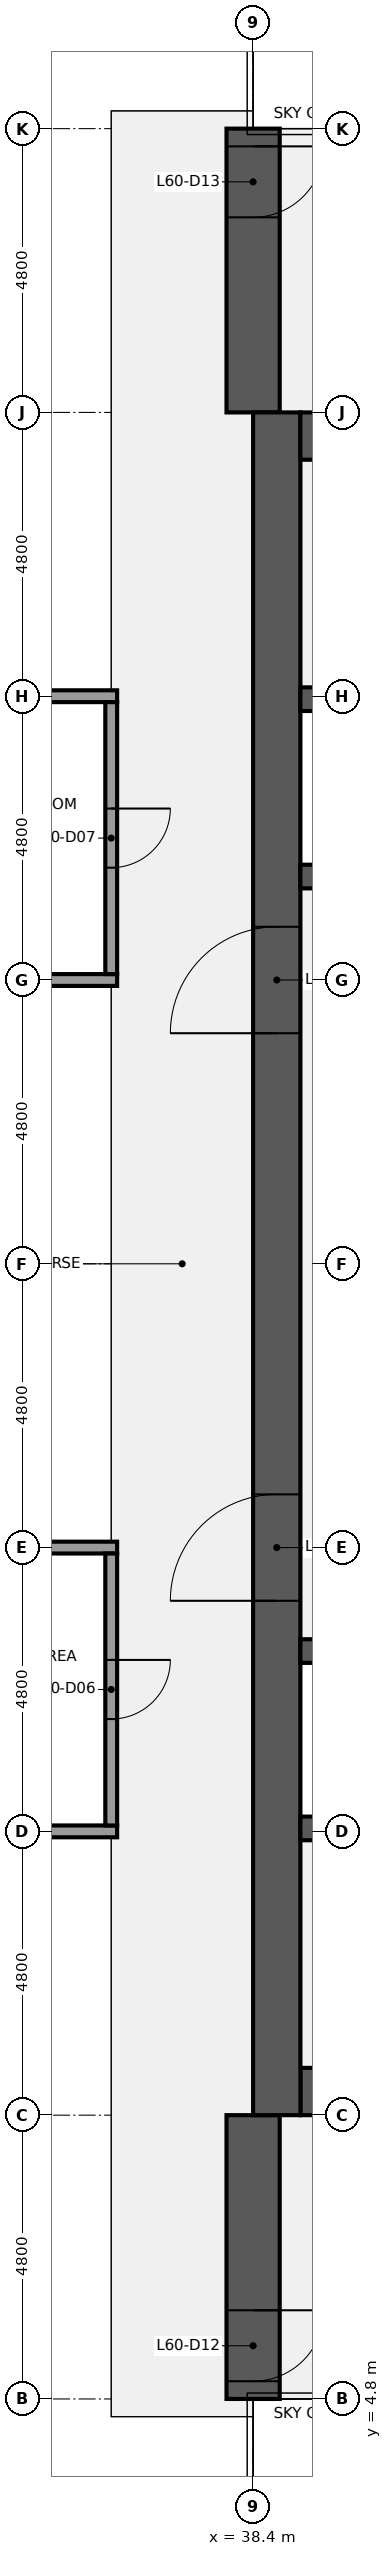
"""IFC4 building model, lengths in metres.
Left out: names, types, materials, properties, quantities, classifications, styles, units other than length and angle.
Written with IfcOpenShell. Run it as: python <this file> out.ifc"""

import sys

from ifc_helpers import new_model, si_unit, direction, frame, frame_2d, origin, place, context, subcontext, project, spatial, rectangle, extrude, element, fill, save


model = new_model("IFC4")
c1 = context("Model", 3, precision=1e-05, world=origin(), true_north=direction((0.0, 1.0)))
c2 = subcontext(c1, "Body", "Model", "MODEL_VIEW")
j1 = project(units=[si_unit("LENGTHUNIT", "METRE"), si_unit("PLANEANGLEUNIT", "RADIAN")], contexts=[c1])
p1 = place(None, origin())
s1 = spatial("IfcSite", under=j1, at=p1, CompositionType="ELEMENT")
p2 = place(p1, origin())
s2 = spatial("IfcBuilding", under=s1, at=p2, CompositionType="ELEMENT")
p3 = place(p2, frame((0.0, 0.0, 269.7)))
s3 = spatial("IfcBuildingStorey", under=s2, at=p3, CompositionType="ELEMENT", Elevation=269.7)
p4 = place(p3, frame((38.4, 4.8, 0.0), z_axis=(0.0, 0.0, 1.0), x_axis=(0.0, 1.0, 0.0)))
e1 = element("IfcWall", 1, at=p4, inside=s3, PredefinedType="SHEAR", context=c2, shape_type="SweptSolid", body=[
    extrude(rectangle(XDim=4.8, YDim=0.9, at=frame_2d((2.4, 0.0))), origin(), (0.0, 0.0, 1.0), 12.3),
])
p5 = place(p4, frame((0.3, 0.0, 0.0)))
e2 = element("IfcOpeningElement", 2, at=p5, cuts=e1, PredefinedType="OPENING", context=c2, shape_type="SweptSolid", body=[
    extrude(rectangle(XDim=1.2, YDim=2.1, at=frame_2d((0.6, 1.05))), frame((0.0, 0.46, 0.0), z_axis=(0.0, -1.0, 0.0), x_axis=(1.0, 0.0, 0.0)), (0.0, 0.0, 1.0), 0.92),
])
p6 = place(p3, frame((38.4, 38.4, 0.0), z_axis=(0.0, 0.0, 1.0), x_axis=(0.0, 1.0, 0.0)))
e3 = element("IfcWall", 3, at=p6, inside=s3, PredefinedType="SHEAR", context=c2, shape_type="SweptSolid", body=[
    extrude(rectangle(XDim=4.8, YDim=0.9, at=frame_2d((2.4, 0.0))), origin(), (0.0, 0.0, 1.0), 12.3),
])
p7 = place(p6, frame((3.3, 0.0, 0.0)))
e4 = element("IfcOpeningElement", 4, at=p7, cuts=e3, PredefinedType="OPENING", context=c2, shape_type="SweptSolid", body=[
    extrude(rectangle(XDim=1.2, YDim=2.1, at=frame_2d((0.6, 1.05))), frame((0.0, 0.46, 0.0), z_axis=(0.0, -1.0, 0.0), x_axis=(1.0, 0.0, 0.0)), (0.0, 0.0, 1.0), 0.92),
])
p8 = place(p3, frame((56.8, 10.0, 0.0), z_axis=(0.0, 0.0, 1.0), x_axis=(-1.0, 0.0, 0.0)))
e5 = element("IfcWall", 5, at=p8, inside=s3, PredefinedType="SHEAR", context=c2, shape_type="SweptSolid", body=[
    extrude(rectangle(XDim=17.6, YDim=0.8, at=frame_2d((8.8, 0.0))), origin(), (0.0, 0.0, 1.0), 12.3),
])
p9 = place(p8, frame((15.45, 0.0, 0.0)))
e6 = element("IfcOpeningElement", 6, at=p9, cuts=e5, PredefinedType="OPENING", context=c2, shape_type="SweptSolid", body=[
    extrude(rectangle(XDim=1.1, YDim=2.1, at=frame_2d((0.55, 1.05))), frame((0.0, 0.41, 0.0), z_axis=(0.0, -1.0, 0.0), x_axis=(1.0, 0.0, 0.0)), (0.0, 0.0, 1.0), 0.82),
])
p10 = place(p8, frame((5.5, 0.0, 0.9)))
e7 = element("IfcOpeningElement", 7, at=p10, cuts=e5, PredefinedType="OPENING", context=c2, shape_type="SweptSolid", body=[
    extrude(rectangle(XDim=1.8, YDim=1.5, at=frame_2d((0.9, 0.75))), frame((0.0, 0.41, 0.0), z_axis=(0.0, -1.0, 0.0), x_axis=(1.0, 0.0, 0.0)), (0.0, 0.0, 1.0), 0.82),
])
p11 = place(p8, frame((10.3, 0.0, 0.9)))
e8 = element("IfcOpeningElement", 8, at=p11, cuts=e5, PredefinedType="OPENING", context=c2, shape_type="SweptSolid", body=[
    extrude(rectangle(XDim=1.8, YDim=1.5, at=frame_2d((0.9, 0.75))), frame((0.0, 0.41, 0.0), z_axis=(0.0, -1.0, 0.0), x_axis=(1.0, 0.0, 0.0)), (0.0, 0.0, 1.0), 0.82),
])
p12 = place(p3, frame((38.8, 9.6, 0.0), z_axis=(0.0, 0.0, 1.0), x_axis=(0.0, 1.0, 0.0)))
e9 = element("IfcWall", 9, at=p12, inside=s3, PredefinedType="SHEAR", context=c2, shape_type="SweptSolid", body=[
    extrude(rectangle(XDim=28.8, YDim=0.8, at=frame_2d((14.4, 0.0))), origin(), (0.0, 0.0, 1.0), 12.3),
])
p13 = place(p12, frame((8.7, 0.0, 0.0)))
e10 = element("IfcOpeningElement", 10, at=p13, cuts=e9, PredefinedType="OPENING", context=c2, shape_type="SweptSolid", body=[
    extrude(rectangle(XDim=1.8, YDim=2.1, at=frame_2d((0.9, 1.05))), frame((0.0, 0.41, 0.0), z_axis=(0.0, -1.0, 0.0), x_axis=(1.0, 0.0, 0.0)), (0.0, 0.0, 1.0), 0.82),
])
p14 = place(p12, frame((18.3, 0.0, 0.0)))
e11 = element("IfcOpeningElement", 11, at=p14, cuts=e9, PredefinedType="OPENING", context=c2, shape_type="SweptSolid", body=[
    extrude(rectangle(XDim=1.8, YDim=2.1, at=frame_2d((0.9, 1.05))), frame((0.0, 0.41, 0.0), z_axis=(0.0, -1.0, 0.0), x_axis=(1.0, 0.0, 0.0)), (0.0, 0.0, 1.0), 0.82),
])
p15 = place(p3, frame((39.2, 14.45, 0.0), z_axis=(0.0, 0.0, 1.0), x_axis=(1.0, 0.0, 0.0)))
e12 = element("IfcWall", 12, at=p15, inside=s3, PredefinedType="SHEAR", context=c2, shape_type="SweptSolid", body=[
    extrude(rectangle(XDim=17.6, YDim=0.4, at=frame_2d((8.8, 0.0))), origin(), (0.0, 0.0, 1.0), 12.3),
])
p16 = place(p3, frame((39.2, 17.45, 0.0), z_axis=(0.0, 0.0, 1.0), x_axis=(1.0, 0.0, 0.0)))
e13 = element("IfcWall", 13, at=p16, inside=s3, PredefinedType="SHEAR", context=c2, shape_type="SweptSolid", body=[
    extrude(rectangle(XDim=17.6, YDim=0.4, at=frame_2d((8.8, 0.0))), origin(), (0.0, 0.0, 1.0), 12.3),
])
p17 = place(p16, frame((14.837, 0.0, 0.0)))
e14 = element("IfcOpeningElement", 14, at=p17, cuts=e13, PredefinedType="OPENING", context=c2, shape_type="SweptSolid", body=[
    extrude(rectangle(XDim=1.0, YDim=2.1, at=frame_2d((0.5, 1.05))), frame((0.0, 0.21, 0.0), z_axis=(0.0, -1.0, 0.0), x_axis=(1.0, 0.0, 0.0)), (0.0, 0.0, 1.0), 0.42),
])
p18 = place(p16, frame((11.3, 0.0, 0.0)))
e15 = element("IfcOpeningElement", 15, at=p18, cuts=e13, PredefinedType="OPENING", context=c2, shape_type="SweptSolid", body=[
    extrude(rectangle(XDim=1.0, YDim=2.1, at=frame_2d((0.5, 1.05))), frame((0.0, 0.21, 0.0), z_axis=(0.0, -1.0, 0.0), x_axis=(1.0, 0.0, 0.0)), (0.0, 0.0, 1.0), 0.42),
])
p19 = place(p16, frame((7.1, 0.0, 0.0)))
e16 = element("IfcOpeningElement", 16, at=p19, cuts=e13, PredefinedType="OPENING", context=c2, shape_type="SweptSolid", body=[
    extrude(rectangle(XDim=1.0, YDim=2.1, at=frame_2d((0.5, 1.05))), frame((0.0, 0.21, 0.0), z_axis=(0.0, -1.0, 0.0), x_axis=(1.0, 0.0, 0.0)), (0.0, 0.0, 1.0), 0.42),
])
p20 = place(p16, frame((1.762, 0.0, 0.0)))
e17 = element("IfcOpeningElement", 17, at=p20, cuts=e13, PredefinedType="OPENING", context=c2, shape_type="SweptSolid", body=[
    extrude(rectangle(XDim=1.0, YDim=2.1, at=frame_2d((0.5, 1.05))), frame((0.0, 0.21, 0.0), z_axis=(0.0, -1.0, 0.0), x_axis=(1.0, 0.0, 0.0)), (0.0, 0.0, 1.0), 0.42),
])
p21 = place(p3, frame((39.2, 30.55, 0.0), z_axis=(0.0, 0.0, 1.0), x_axis=(1.0, 0.0, 0.0)))
e18 = element("IfcWall", 18, at=p21, inside=s3, PredefinedType="SHEAR", context=c2, shape_type="SweptSolid", body=[
    extrude(rectangle(XDim=17.6, YDim=0.4, at=frame_2d((8.8, 0.0))), origin(), (0.0, 0.0, 1.0), 12.3),
])
p22 = place(p21, frame((15.0, 0.0, 0.0)))
e19 = element("IfcOpeningElement", 19, at=p22, cuts=e18, PredefinedType="OPENING", context=c2, shape_type="SweptSolid", body=[
    extrude(rectangle(XDim=1.2, YDim=2.1, at=frame_2d((0.6, 1.05))), frame((0.0, 0.21, 0.0), z_axis=(0.0, -1.0, 0.0), x_axis=(1.0, 0.0, 0.0)), (0.0, 0.0, 1.0), 0.42),
])
p23 = place(p21, frame((12.4, 0.0, 0.0)))
e20 = element("IfcOpeningElement", 20, at=p23, cuts=e18, PredefinedType="OPENING", context=c2, shape_type="SweptSolid", body=[
    extrude(rectangle(XDim=1.2, YDim=2.1, at=frame_2d((0.6, 1.05))), frame((0.0, 0.21, 0.0), z_axis=(0.0, -1.0, 0.0), x_axis=(1.0, 0.0, 0.0)), (0.0, 0.0, 1.0), 0.42),
])
p24 = place(p21, frame((9.8, 0.0, 0.0)))
e21 = element("IfcOpeningElement", 21, at=p24, cuts=e18, PredefinedType="OPENING", context=c2, shape_type="SweptSolid", body=[
    extrude(rectangle(XDim=1.2, YDim=2.1, at=frame_2d((0.6, 1.05))), frame((0.0, 0.21, 0.0), z_axis=(0.0, -1.0, 0.0), x_axis=(1.0, 0.0, 0.0)), (0.0, 0.0, 1.0), 0.42),
])
p25 = place(p21, frame((6.6, 0.0, 0.0)))
e22 = element("IfcOpeningElement", 22, at=p25, cuts=e18, PredefinedType="OPENING", context=c2, shape_type="SweptSolid", body=[
    extrude(rectangle(XDim=1.2, YDim=2.1, at=frame_2d((0.6, 1.05))), frame((0.0, 0.21, 0.0), z_axis=(0.0, -1.0, 0.0), x_axis=(1.0, 0.0, 0.0)), (0.0, 0.0, 1.0), 0.42),
])
p26 = place(p21, frame((4.0, 0.0, 0.0)))
e23 = element("IfcOpeningElement", 23, at=p26, cuts=e18, PredefinedType="OPENING", context=c2, shape_type="SweptSolid", body=[
    extrude(rectangle(XDim=1.2, YDim=2.1, at=frame_2d((0.6, 1.05))), frame((0.0, 0.21, 0.0), z_axis=(0.0, -1.0, 0.0), x_axis=(1.0, 0.0, 0.0)), (0.0, 0.0, 1.0), 0.42),
])
p27 = place(p21, frame((1.4, 0.0, 0.0)))
e24 = element("IfcOpeningElement", 24, at=p27, cuts=e18, PredefinedType="OPENING", context=c2, shape_type="SweptSolid", body=[
    extrude(rectangle(XDim=1.2, YDim=2.1, at=frame_2d((0.6, 1.05))), frame((0.0, 0.21, 0.0), z_axis=(0.0, -1.0, 0.0), x_axis=(1.0, 0.0, 0.0)), (0.0, 0.0, 1.0), 0.42),
])
p28 = place(p3, frame((39.2, 33.55, 0.0), z_axis=(0.0, 0.0, 1.0), x_axis=(1.0, 0.0, 0.0)))
e25 = element("IfcWall", 25, at=p28, inside=s3, PredefinedType="SHEAR", context=c2, shape_type="SweptSolid", body=[
    extrude(rectangle(XDim=17.6, YDim=0.4, at=frame_2d((8.8, 0.0))), origin(), (0.0, 0.0, 1.0), 12.3),
])
p29 = place(p3, frame((39.2, 38.0, 0.0), z_axis=(0.0, 0.0, 1.0), x_axis=(1.0, 0.0, 0.0)))
e26 = element("IfcWall", 26, at=p29, inside=s3, PredefinedType="SHEAR", context=c2, shape_type="SweptSolid", body=[
    extrude(rectangle(XDim=17.6, YDim=0.8, at=frame_2d((8.8, 0.0))), origin(), (0.0, 0.0, 1.0), 12.3),
])
p30 = place(p29, frame((1.05, 0.0, 0.0)))
e27 = element("IfcOpeningElement", 27, at=p30, cuts=e26, PredefinedType="OPENING", context=c2, shape_type="SweptSolid", body=[
    extrude(rectangle(XDim=1.1, YDim=2.1, at=frame_2d((0.55, 1.05))), frame((0.0, 0.41, 0.0), z_axis=(0.0, -1.0, 0.0), x_axis=(1.0, 0.0, 0.0)), (0.0, 0.0, 1.0), 0.82),
])
p31 = place(p29, frame((10.3, 0.0, 0.9)))
e28 = element("IfcOpeningElement", 28, at=p31, cuts=e26, PredefinedType="OPENING", context=c2, shape_type="SweptSolid", body=[
    extrude(rectangle(XDim=1.8, YDim=1.5, at=frame_2d((0.9, 0.75))), frame((0.0, 0.41, 0.0), z_axis=(0.0, -1.0, 0.0), x_axis=(1.0, 0.0, 0.0)), (0.0, 0.0, 1.0), 0.82),
])
p32 = place(p29, frame((5.5, 0.0, 0.9)))
e29 = element("IfcOpeningElement", 29, at=p32, cuts=e26, PredefinedType="OPENING", context=c2, shape_type="SweptSolid", body=[
    extrude(rectangle(XDim=1.8, YDim=1.5, at=frame_2d((0.9, 0.75))), frame((0.0, 0.41, 0.0), z_axis=(0.0, -1.0, 0.0), x_axis=(1.0, 0.0, 0.0)), (0.0, 0.0, 1.0), 0.82),
])
for number, where, z_axis, x_axis in (
    (30, (31.1, 14.4, 0.0), (0.0, 0.0, 1.0), (1.0, 0.0, 0.0)),
    (31, (31.1, 19.2, 0.0), (0.0, 0.0, 1.0), (1.0, 0.0, 0.0)),
    (32, (31.1, 28.8, 0.0), (0.0, 0.0, 1.0), (1.0, 0.0, 0.0)),
    (33, (31.1, 33.6, 0.0), (0.0, 0.0, 1.0), (1.0, 0.0, 0.0)),
):
    element("IfcWall", number, at=place(p3, frame(where, z_axis=z_axis, x_axis=x_axis)), inside=s3, PredefinedType="PARTITIONING", context=c2, shape_type="SweptSolid", body=[
        extrude(rectangle(XDim=5.0, YDim=0.2, at=frame_2d((2.5, 0.0))), origin(), (0.0, 0.0, 1.0), 11.31),
    ])
p33 = place(p3, frame((36.0, 14.5, 0.0), z_axis=(0.0, 0.0, 1.0), x_axis=(0.0, 1.0, 0.0)))
e34 = element("IfcWall", 34, at=p33, inside=s3, PredefinedType="PARTITIONING", context=c2, shape_type="SweptSolid", body=[
    extrude(rectangle(XDim=4.6, YDim=0.2, at=frame_2d((2.3, 0.0))), origin(), (0.0, 0.0, 1.0), 11.31),
])
p34 = place(p33, frame((1.8, 0.0, 0.0)))
e35 = element("IfcOpeningElement", 35, at=p34, cuts=e34, PredefinedType="OPENING", context=c2, shape_type="SweptSolid", body=[
    extrude(rectangle(XDim=1.0, YDim=2.1, at=frame_2d((0.5, 1.05))), frame((0.0, 0.11, 0.0), z_axis=(0.0, -1.0, 0.0), x_axis=(1.0, 0.0, 0.0)), (0.0, 0.0, 1.0), 0.22),
])
p35 = place(p3, frame((36.0, 28.9, 0.0), z_axis=(0.0, 0.0, 1.0), x_axis=(0.0, 1.0, 0.0)))
e36 = element("IfcWall", 36, at=p35, inside=s3, PredefinedType="PARTITIONING", context=c2, shape_type="SweptSolid", body=[
    extrude(rectangle(XDim=4.6, YDim=0.2, at=frame_2d((2.3, 0.0))), origin(), (0.0, 0.0, 1.0), 11.31),
])
p36 = place(p35, frame((1.8, 0.0, 0.0)))
e37 = element("IfcOpeningElement", 37, at=p36, cuts=e36, PredefinedType="OPENING", context=c2, shape_type="SweptSolid", body=[
    extrude(rectangle(XDim=1.0, YDim=2.1, at=frame_2d((0.5, 1.05))), frame((0.0, 0.11, 0.0), z_axis=(0.0, -1.0, 0.0), x_axis=(1.0, 0.0, 0.0)), (0.0, 0.0, 1.0), 0.22),
])
p37 = place(p13, origin())
e38 = element("IfcDoor", 38, at=p37, inside=s3, OperationType="DOUBLE_DOOR_SINGLE_SWING", PredefinedType="DOOR", context=c2, shape_type="SweptSolid", body=[
    extrude(rectangle(XDim=1.8, YDim=2.1, at=frame_2d((0.9, 1.05))), frame((0.0, 0.025, 0.0), z_axis=(0.0, -1.0, 0.0), x_axis=(1.0, 0.0, 0.0)), (0.0, 0.0, 1.0), 0.05),
])
fill(e10, e38)
p38 = place(p14, origin())
e39 = element("IfcDoor", 39, at=p38, inside=s3, OperationType="DOUBLE_DOOR_SINGLE_SWING", PredefinedType="DOOR", context=c2, shape_type="SweptSolid", body=[
    extrude(rectangle(XDim=1.8, YDim=2.1, at=frame_2d((0.9, 1.05))), frame((0.0, 0.025, 0.0), z_axis=(0.0, -1.0, 0.0), x_axis=(1.0, 0.0, 0.0)), (0.0, 0.0, 1.0), 0.05),
])
fill(e11, e39)
p39 = place(p34, origin())
e40 = element("IfcDoor", 40, at=p39, inside=s3, OperationType="SINGLE_SWING_RIGHT", PredefinedType="DOOR", context=c2, shape_type="SweptSolid", body=[
    extrude(rectangle(XDim=1.0, YDim=2.1, at=frame_2d((0.5, 1.05))), frame((0.0, 0.025, 0.0), z_axis=(0.0, -1.0, 0.0), x_axis=(1.0, 0.0, 0.0)), (0.0, 0.0, 1.0), 0.05),
])
fill(e35, e40)
p40 = place(p36, origin())
e41 = element("IfcDoor", 41, at=p40, inside=s3, OperationType="SINGLE_SWING_RIGHT", PredefinedType="DOOR", context=c2, shape_type="SweptSolid", body=[
    extrude(rectangle(XDim=1.0, YDim=2.1, at=frame_2d((0.5, 1.05))), frame((0.0, 0.025, 0.0), z_axis=(0.0, -1.0, 0.0), x_axis=(1.0, 0.0, 0.0)), (0.0, 0.0, 1.0), 0.05),
])
fill(e37, e41)
p41 = place(p5, origin())
e42 = element("IfcDoor", 42, at=p41, inside=s3, OperationType="SINGLE_SWING_RIGHT", PredefinedType="DOOR", context=c2, shape_type="SweptSolid", body=[
    extrude(rectangle(XDim=1.2, YDim=2.1, at=frame_2d((0.6, 1.05))), frame((0.0, 0.025, 0.0), z_axis=(0.0, -1.0, 0.0), x_axis=(1.0, 0.0, 0.0)), (0.0, 0.0, 1.0), 0.05),
])
fill(e2, e42)
p42 = place(p7, origin())
e43 = element("IfcDoor", 43, at=p42, inside=s3, OperationType="SINGLE_SWING_RIGHT", PredefinedType="DOOR", context=c2, shape_type="SweptSolid", body=[
    extrude(rectangle(XDim=1.2, YDim=2.1, at=frame_2d((0.6, 1.05))), frame((0.0, 0.025, 0.0), z_axis=(0.0, -1.0, 0.0), x_axis=(1.0, 0.0, 0.0)), (0.0, 0.0, 1.0), 0.05),
])
fill(e4, e43)
save(model, sys.argv[1])
